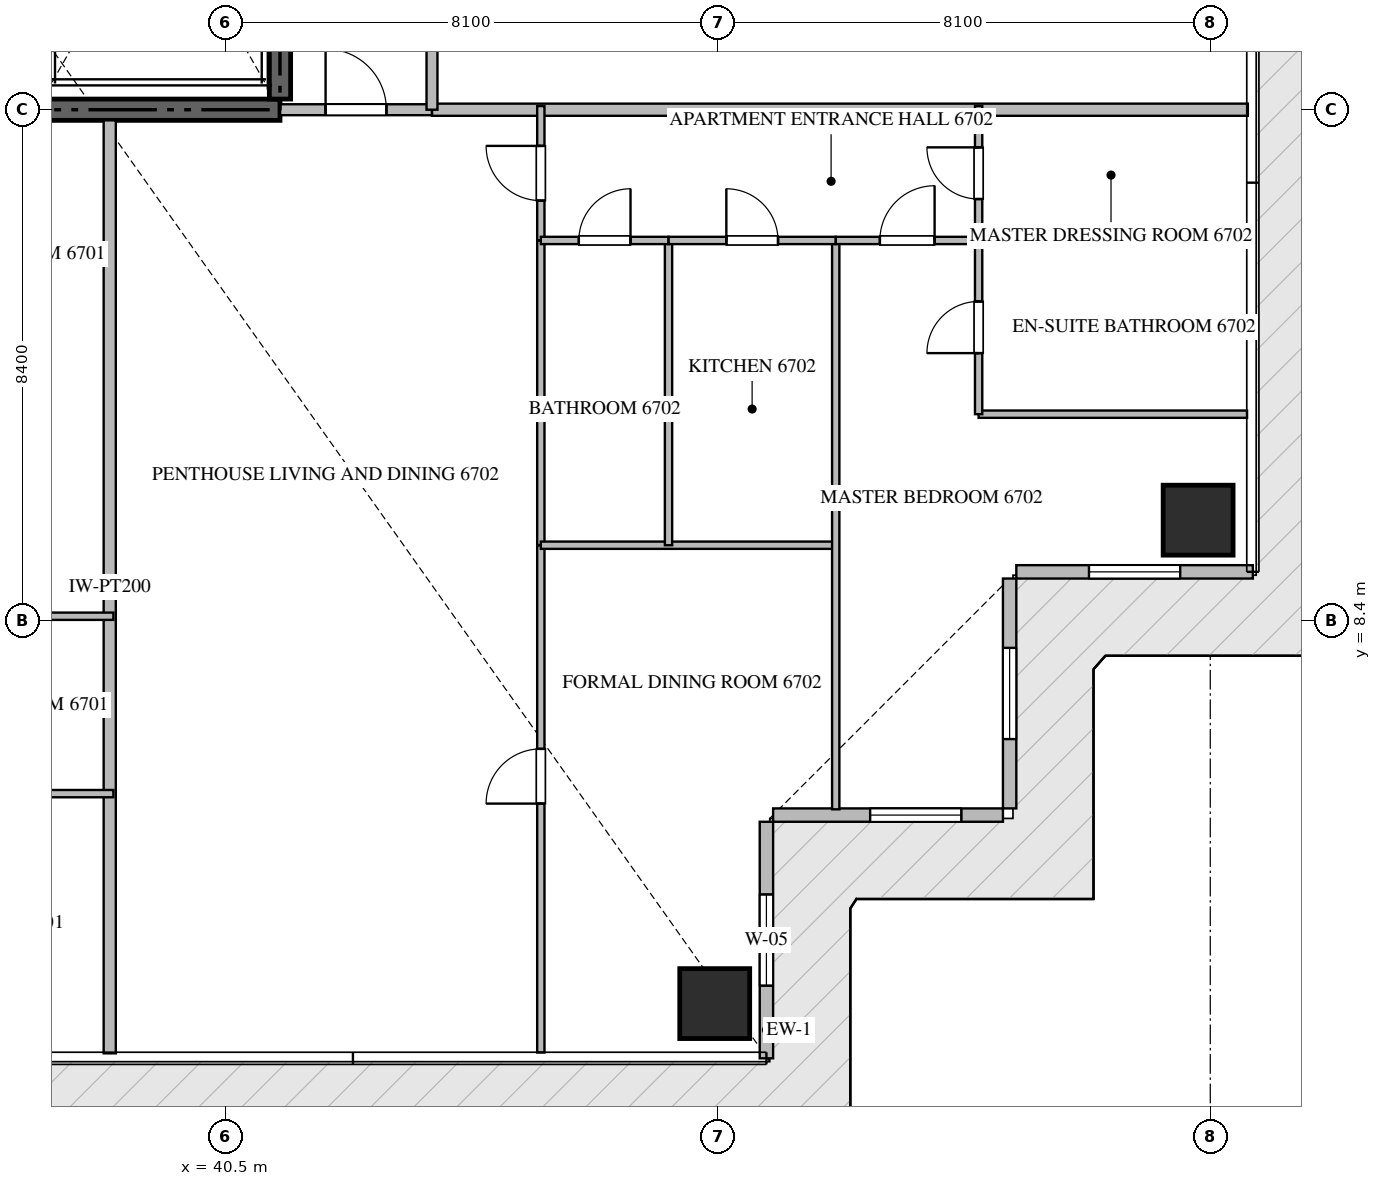
"""IFC4 building model, lengths in metres.
Left out: names, types, materials, properties, quantities, classifications, styles, units other than length and angle.
Written with IfcOpenShell. Run it as: python <this file> out.ifc"""

import sys

from ifc_helpers import new_model, si_unit, direction, frame, frame_2d, origin, origin_2d, place, context, subcontext, project, spatial, rectangle, extrude, source, transform, mapped, element, fill, save


model = new_model("IFC4")
c1 = context("Model", 3, precision=1e-05, world=origin(), true_north=direction((0.0, 1.0)))
c2 = subcontext(c1, "Body", "Model", "MODEL_VIEW")
j1 = project(units=[si_unit("LENGTHUNIT", "METRE"), si_unit("PLANEANGLEUNIT", "RADIAN")], contexts=[c1])
p1 = place(None, origin())
s1 = spatial("IfcSite", under=j1, at=p1, CompositionType="ELEMENT")
p2 = place(p1, origin())
s2 = spatial("IfcBuilding", under=s1, at=p2, CompositionType="ELEMENT")
p3 = place(p2, frame((0.0, 0.0, 268.2)))
s3 = spatial("IfcBuildingStorey", under=s2, at=p3, CompositionType="ELEMENT", Elevation=268.2)
p4 = place(p3, frame((23.4, 16.8, -0.26), z_axis=(0.0, 0.0, 1.0), x_axis=(1.0, 0.0, 0.0)))
e1 = element("IfcWall", 1, at=p4, inside=s3, PredefinedType="SHEAR", context=c2, shape_type="SweptSolid", body=[
    extrude(rectangle(XDim=18.0, YDim=0.35, at=frame_2d((9.0, 0.0))), origin(), (0.0, 0.0, 1.0), 3.848),
])
p5 = place(p3, frame((41.4, 16.975, -0.26), z_axis=(0.0, 0.0, 1.0), x_axis=(0.0, 1.0, 0.0)))
e2 = element("IfcWall", 2, at=p5, inside=s3, PredefinedType="SHEAR", context=c2, shape_type="SweptSolid", body=[
    extrude(rectangle(XDim=8.375, YDim=0.35, at=frame_2d((4.188, 0.0))), origin(), (0.0, 0.0, 1.0), 3.848),
])
m1 = source(origin(), c2, "Body", "SweptSolid", [
    extrude(rectangle(XDim=1.15, YDim=1.15, at=origin_2d()), origin(), (0.0, 0.0, 1.0), 3.85),
])
for number, where, z_axis, x_axis in (
    (3, (48.55, 2.1, -0.26), (0.0, 0.0, 1.0), (1.0, 0.0, 0.0)),
    (4, (56.5, 10.05, -0.26), (0.0, 0.0, 1.0), (1.0, 0.0, 0.0)),
):
    element("IfcColumn", number, at=place(p3, frame(where, z_axis=z_axis, x_axis=x_axis)), inside=s3, PredefinedType="COLUMN", context=c2, shape_type="MappedRepresentation", body=[
        mapped(m1, transform((0.0, 0.0, 0.0), scale=1.0)),
    ])
p6 = place(p3, frame((49.4, 1.2, 0.0), z_axis=(0.0, 0.0, 1.0), x_axis=(0.0, 1.0, 0.0)))
e5 = element("IfcWall", 5, at=p6, inside=s3, PredefinedType="ELEMENTEDWALL", context=c2, shape_type="SweptSolid", body=[
    extrude(rectangle(XDim=3.89, YDim=0.22, at=frame_2d((1.945, 0.0))), origin(), (0.0, 0.0, 1.0), 3.575),
])
p7 = place(p6, frame((1.195, 0.0, 0.65)))
e6 = element("IfcOpeningElement", 6, at=p7, cuts=e5, PredefinedType="OPENING", context=c2, shape_type="SweptSolid", body=[
    extrude(rectangle(XDim=1.5, YDim=2.25, at=frame_2d((0.75, 1.125))), frame((0.0, 0.12, 0.0), z_axis=(0.0, -1.0, 0.0), x_axis=(1.0, 0.0, 0.0)), (0.0, 0.0, 1.0), 0.24),
])
p8 = place(p3, frame((49.51, 5.2, 0.0), z_axis=(0.0, 0.0, 1.0), x_axis=(1.0, 0.0, 0.0)))
e7 = element("IfcWall", 7, at=p8, inside=s3, PredefinedType="ELEMENTEDWALL", context=c2, shape_type="SweptSolid", body=[
    extrude(rectangle(XDim=3.78, YDim=0.22, at=frame_2d((1.89, 0.0))), origin(), (0.0, 0.0, 1.0), 3.575),
])
p9 = place(p8, frame((1.596, 0.0, 0.65)))
e8 = element("IfcOpeningElement", 8, at=p9, cuts=e7, PredefinedType="OPENING", context=c2, shape_type="SweptSolid", body=[
    extrude(rectangle(XDim=1.5, YDim=2.25, at=frame_2d((0.75, 1.125))), frame((0.0, 0.12, 0.0), z_axis=(0.0, -1.0, 0.0), x_axis=(1.0, 0.0, 0.0)), (0.0, 0.0, 1.0), 0.24),
])
p10 = place(p3, frame((53.4, 5.31, 0.0), z_axis=(0.0, 0.0, 1.0), x_axis=(0.0, 1.0, 0.0)))
e9 = element("IfcWall", 9, at=p10, inside=s3, PredefinedType="ELEMENTEDWALL", context=c2, shape_type="SweptSolid", body=[
    extrude(rectangle(XDim=3.78, YDim=0.22, at=frame_2d((1.89, 0.0))), origin(), (0.0, 0.0, 1.0), 3.575),
])
p11 = place(p10, frame((1.14, 0.0, 0.65)))
e10 = element("IfcOpeningElement", 10, at=p11, cuts=e9, PredefinedType="OPENING", context=c2, shape_type="SweptSolid", body=[
    extrude(rectangle(XDim=1.5, YDim=2.25, at=frame_2d((0.75, 1.125))), frame((0.0, 0.12, 0.0), z_axis=(0.0, -1.0, 0.0), x_axis=(1.0, 0.0, 0.0)), (0.0, 0.0, 1.0), 0.24),
])
p12 = place(p3, frame((53.51, 9.2, 0.0), z_axis=(0.0, 0.0, 1.0), x_axis=(1.0, 0.0, 0.0)))
e11 = element("IfcWall", 11, at=p12, inside=s3, PredefinedType="ELEMENTEDWALL", context=c2, shape_type="SweptSolid", body=[
    extrude(rectangle(XDim=3.89, YDim=0.22, at=frame_2d((1.945, 0.0))), origin(), (0.0, 0.0, 1.0), 3.575),
])
p13 = place(p12, frame((1.195, 0.0, 0.65)))
e12 = element("IfcOpeningElement", 12, at=p13, cuts=e11, PredefinedType="OPENING", context=c2, shape_type="SweptSolid", body=[
    extrude(rectangle(XDim=1.5, YDim=2.25, at=frame_2d((0.75, 1.125))), frame((0.0, 0.12, 0.0), z_axis=(0.0, -1.0, 0.0), x_axis=(1.0, 0.0, 0.0)), (0.0, 0.0, 1.0), 0.24),
])
p14 = place(p3, frame((38.6, 1.282, 0.0), z_axis=(0.0, 0.0, 1.0), x_axis=(0.0, 1.0, 0.0)))
e13 = element("IfcWall", 13, at=p14, inside=s3, PredefinedType="PARTITIONING", context=c2, shape_type="SweptSolid", body=[
    extrude(rectangle(XDim=15.343, YDim=0.2, at=frame_2d((7.671, 0.0))), origin(), (0.0, 0.0, 1.0), 3.59),
])
p15 = place(p3, frame((43.9, 16.8, 0.0), z_axis=(0.0, 0.0, 1.0), x_axis=(1.0, 0.0, 0.0)))
e14 = element("IfcWall", 14, at=p15, inside=s3, PredefinedType="PARTITIONING", context=c2, shape_type="SweptSolid", body=[
    extrude(rectangle(XDim=13.418, YDim=0.2, at=frame_2d((6.709, 0.0))), origin(), (0.0, 0.0, 1.0), 3.59),
])
p16 = place(p3, frame((41.402, 16.8, 0.0), z_axis=(0.0, 0.0, 1.0), x_axis=(1.0, 0.0, 0.0)))
e15 = element("IfcWall", 15, at=p16, inside=s3, PredefinedType="PARTITIONING", context=c2, shape_type="SweptSolid", body=[
    extrude(rectangle(XDim=2.496, YDim=0.18, at=frame_2d((1.248, 0.0))), origin(), (0.0, 0.0, 1.0), 3.59),
])
p17 = place(p16, frame((0.748, 0.0, 0.0)))
e16 = element("IfcOpeningElement", 16, at=p17, cuts=e15, PredefinedType="OPENING", context=c2, shape_type="SweptSolid", body=[
    extrude(rectangle(XDim=1.0, YDim=2.15, at=frame_2d((0.5, 1.075))), frame((0.0, 0.1, 0.0), z_axis=(0.0, -1.0, 0.0), x_axis=(1.0, 0.0, 0.0)), (0.0, 0.0, 1.0), 0.2),
])
p18 = place(p3, frame((43.9, 16.8, 0.0), z_axis=(0.0, 0.0, 1.0), x_axis=(0.0, 1.0, 0.0)))
e17 = element("IfcWall", 17, at=p18, inside=s3, PredefinedType="PARTITIONING", context=c2, shape_type="SweptSolid", body=[
    extrude(rectangle(XDim=16.8, YDim=0.18, at=frame_2d((8.4, 0.0))), origin(), (0.0, 0.0, 1.0), 3.59),
])
p19 = place(p18, frame((2.67, 0.0, 0.0)))
e18 = element("IfcOpeningElement", 18, at=p19, cuts=e17, PredefinedType="OPENING", context=c2, shape_type="SweptSolid", body=[
    extrude(rectangle(XDim=1.0, YDim=2.15, at=frame_2d((0.5, 1.075))), frame((0.0, 0.1, 0.0), z_axis=(0.0, -1.0, 0.0), x_axis=(1.0, 0.0, 0.0)), (0.0, 0.0, 1.0), 0.2),
])
p20 = place(p18, frame((11.107, 0.0, 0.0)))
e19 = element("IfcOpeningElement", 19, at=p20, cuts=e17, PredefinedType="OPENING", context=c2, shape_type="SweptSolid", body=[
    extrude(rectangle(XDim=1.0, YDim=2.15, at=frame_2d((0.5, 1.075))), frame((0.0, 0.1, 0.0), z_axis=(0.0, -1.0, 0.0), x_axis=(1.0, 0.0, 0.0)), (0.0, 0.0, 1.0), 0.2),
])
for number, where, z_axis, x_axis in (
    (20, (33.8, 5.553, 0.0), (0.0, 0.0, 1.0), (1.0, 0.0, 0.0)),
    (21, (33.8, 8.47, 0.0), (0.0, 0.0, 1.0), (1.0, 0.0, 0.0)),
):
    element("IfcWall", number, at=place(p3, frame(where, z_axis=z_axis, x_axis=x_axis)), inside=s3, PredefinedType="PARTITIONING", context=c2, shape_type="SweptSolid", body=[
        extrude(rectangle(XDim=4.86, YDim=0.12, at=frame_2d((2.43, 0.0))), origin(), (0.0, 0.0, 1.0), 3.59),
    ])
p21 = place(p3, frame((45.69, 14.65, 0.0), z_axis=(0.0, 0.0, 1.0), x_axis=(0.0, 1.0, 0.0)))
e22 = element("IfcWall", 22, at=p21, inside=s3, PredefinedType="PARTITIONING", context=c2, shape_type="SweptSolid", body=[
    extrude(rectangle(XDim=2.21, YDim=0.12, at=frame_2d((1.105, 0.0))), origin(), (0.0, 0.0, 1.0), 3.59),
])
p22 = place(p21, frame((0.655, 0.0, 0.0)))
e23 = element("IfcOpeningElement", 23, at=p22, cuts=e22, PredefinedType="OPENING", context=c2, shape_type="SweptSolid", body=[
    extrude(rectangle(XDim=0.9, YDim=2.1, at=frame_2d((0.45, 1.05))), frame((0.0, 0.07, 0.0), z_axis=(0.0, -1.0, 0.0), x_axis=(1.0, 0.0, 0.0)), (0.0, 0.0, 1.0), 0.14),
])
p23 = place(p3, frame((45.69, 1.295, 0.0), z_axis=(0.0, 0.0, 1.0), x_axis=(0.0, 1.0, 0.0)))
e24 = element("IfcWall", 24, at=p23, inside=s3, PredefinedType="PARTITIONING", context=c2, shape_type="SweptSolid", body=[
    extrude(rectangle(XDim=8.343, YDim=0.12, at=frame_2d((4.171, 0.0))), origin(), (0.0, 0.0, 1.0), 3.59),
])
p24 = place(p23, frame((4.094, 0.0, 0.0)))
e25 = element("IfcOpeningElement", 25, at=p24, cuts=e24, PredefinedType="OPENING", context=c2, shape_type="SweptSolid", body=[
    extrude(rectangle(XDim=0.9, YDim=2.1, at=frame_2d((0.45, 1.05))), frame((0.0, 0.07, 0.0), z_axis=(0.0, -1.0, 0.0), x_axis=(1.0, 0.0, 0.0)), (0.0, 0.0, 1.0), 0.14),
])
p25 = place(p3, frame((45.69, 9.64, 0.0), z_axis=(0.0, 0.0, 1.0), x_axis=(0.0, 1.0, 0.0)))
e26 = element("IfcWall", 26, at=p25, inside=s3, PredefinedType="PARTITIONING", context=c2, shape_type="SweptSolid", body=[
    extrude(rectangle(XDim=5.008, YDim=0.12, at=frame_2d((2.504, 0.0))), origin(), (0.0, 0.0, 1.0), 3.59),
])
p26 = place(p3, frame((45.69, 9.638, 0.0), z_axis=(0.0, 0.0, 1.0), x_axis=(1.0, 0.0, 0.0)))
e27 = element("IfcWall", 27, at=p26, inside=s3, PredefinedType="PARTITIONING", context=c2, shape_type="SweptSolid", body=[
    extrude(rectangle(XDim=4.85, YDim=0.12, at=frame_2d((2.425, 0.0))), origin(), (0.0, 0.0, 1.0), 3.59),
])
p27 = place(p3, frame((50.54, 5.295, 0.0), z_axis=(0.0, 0.0, 1.0), x_axis=(0.0, 1.0, 0.0)))
e28 = element("IfcWall", 28, at=p27, inside=s3, PredefinedType="PARTITIONING", context=c2, shape_type="SweptSolid", body=[
    extrude(rectangle(XDim=9.355, YDim=0.12, at=frame_2d((4.677, 0.0))), origin(), (0.0, 0.0, 1.0), 3.59),
])
p28 = place(p3, frame((47.79, 9.638, 0.0), z_axis=(0.0, 0.0, 1.0), x_axis=(0.0, 1.0, 0.0)))
e29 = element("IfcWall", 29, at=p28, inside=s3, PredefinedType="PARTITIONING", context=c2, shape_type="SweptSolid", body=[
    extrude(rectangle(XDim=5.012, YDim=0.12, at=frame_2d((2.506, 0.0))), origin(), (0.0, 0.0, 1.0), 3.59),
])
p29 = place(p3, frame((45.69, 14.65, 0.0), z_axis=(0.0, 0.0, 1.0), x_axis=(1.0, 0.0, 0.0)))
e30 = element("IfcWall", 30, at=p29, inside=s3, PredefinedType="PARTITIONING", context=c2, shape_type="SweptSolid", body=[
    extrude(rectangle(XDim=2.1, YDim=0.12, at=frame_2d((1.05, 0.0))), origin(), (0.0, 0.0, 1.0), 3.59),
])
p30 = place(p29, frame((0.625, 0.0, 0.0)))
e31 = element("IfcOpeningElement", 31, at=p30, cuts=e30, PredefinedType="OPENING", context=c2, shape_type="SweptSolid", body=[
    extrude(rectangle(XDim=0.85, YDim=2.1, at=frame_2d((0.425, 1.05))), frame((0.0, 0.07, 0.0), z_axis=(0.0, -1.0, 0.0), x_axis=(1.0, 0.0, 0.0)), (0.0, 0.0, 1.0), 0.14),
])
p31 = place(p3, frame((47.792, 14.65, 0.0), z_axis=(0.0, 0.0, 1.0), x_axis=(1.0, 0.0, 0.0)))
e32 = element("IfcWall", 32, at=p31, inside=s3, PredefinedType="PARTITIONING", context=c2, shape_type="SweptSolid", body=[
    extrude(rectangle(XDim=2.748, YDim=0.12, at=frame_2d((1.374, 0.0))), origin(), (0.0, 0.0, 1.0), 3.59),
])
p32 = place(p31, frame((0.949, 0.0, 0.0)))
e33 = element("IfcOpeningElement", 33, at=p32, cuts=e32, PredefinedType="OPENING", context=c2, shape_type="SweptSolid", body=[
    extrude(rectangle(XDim=0.85, YDim=2.1, at=frame_2d((0.425, 1.05))), frame((0.0, 0.07, 0.0), z_axis=(0.0, -1.0, 0.0), x_axis=(1.0, 0.0, 0.0)), (0.0, 0.0, 1.0), 0.14),
])
p33 = place(p3, frame((50.542, 14.65, 0.0), z_axis=(0.0, 0.0, 1.0), x_axis=(1.0, 0.0, 0.0)))
e34 = element("IfcWall", 34, at=p33, inside=s3, PredefinedType="PARTITIONING", context=c2, shape_type="SweptSolid", body=[
    extrude(rectangle(XDim=2.348, YDim=0.12, at=frame_2d((1.174, 0.0))), origin(), (0.0, 0.0, 1.0), 3.59),
])
p34 = place(p33, frame((0.724, 0.0, 0.0)))
e35 = element("IfcOpeningElement", 35, at=p34, cuts=e34, PredefinedType="OPENING", context=c2, shape_type="SweptSolid", body=[
    extrude(rectangle(XDim=0.9, YDim=2.1, at=frame_2d((0.45, 1.05))), frame((0.0, 0.07, 0.0), z_axis=(0.0, -1.0, 0.0), x_axis=(1.0, 0.0, 0.0)), (0.0, 0.0, 1.0), 0.14),
])
p35 = place(p3, frame((52.89, 11.793, 0.0), z_axis=(0.0, 0.0, 1.0), x_axis=(1.0, 0.0, 0.0)))
e36 = element("IfcWall", 36, at=p35, inside=s3, PredefinedType="PARTITIONING", context=c2, shape_type="SweptSolid", body=[
    extrude(rectangle(XDim=4.415, YDim=0.12, at=frame_2d((2.208, 0.0))), origin(), (0.0, 0.0, 1.0), 3.59),
])
p36 = place(p3, frame((52.892, 14.65, 0.0), z_axis=(0.0, 0.0, 1.0), x_axis=(1.0, 0.0, 0.0)))
e37 = element("IfcWall", 37, at=p36, inside=s3, PredefinedType="PARTITIONING", context=c2, shape_type="SweptSolid", body=[
    extrude(rectangle(XDim=4.413, YDim=0.12, at=frame_2d((2.207, 0.0))), origin(), (0.0, 0.0, 1.0), 3.59),
])
p37 = place(p3, frame((52.89, 11.793, 0.0), z_axis=(0.0, 0.0, 1.0), x_axis=(0.0, 1.0, 0.0)))
e38 = element("IfcWall", 38, at=p37, inside=s3, PredefinedType="PARTITIONING", context=c2, shape_type="SweptSolid", body=[
    extrude(rectangle(XDim=2.857, YDim=0.12, at=frame_2d((1.428, 0.0))), origin(), (0.0, 0.0, 1.0), 3.59),
])
p38 = place(p37, frame((1.004, 0.0, 0.0)))
e39 = element("IfcOpeningElement", 39, at=p38, cuts=e38, PredefinedType="OPENING", context=c2, shape_type="SweptSolid", body=[
    extrude(rectangle(XDim=0.85, YDim=2.1, at=frame_2d((0.425, 1.05))), frame((0.0, 0.07, 0.0), z_axis=(0.0, -1.0, 0.0), x_axis=(1.0, 0.0, 0.0)), (0.0, 0.0, 1.0), 0.14),
])
p39 = place(p3, frame((52.89, 14.652, 0.0), z_axis=(0.0, 0.0, 1.0), x_axis=(0.0, 1.0, 0.0)))
e40 = element("IfcWall", 40, at=p39, inside=s3, PredefinedType="PARTITIONING", context=c2, shape_type="SweptSolid", body=[
    extrude(rectangle(XDim=2.208, YDim=0.12, at=frame_2d((1.104, 0.0))), origin(), (0.0, 0.0, 1.0), 3.59),
])
p40 = place(p39, frame((0.679, 0.0, 0.0)))
e41 = element("IfcOpeningElement", 41, at=p40, cuts=e40, PredefinedType="OPENING", context=c2, shape_type="SweptSolid", body=[
    extrude(rectangle(XDim=0.85, YDim=2.1, at=frame_2d((0.425, 1.05))), frame((0.0, 0.07, 0.0), z_axis=(0.0, -1.0, 0.0), x_axis=(1.0, 0.0, 0.0)), (0.0, 0.0, 1.0), 0.14),
])
m2 = source(origin(), c2, "Body", "SweptSolid", [
    extrude(rectangle(XDim=1.5, YDim=2.25, at=frame_2d((0.75, 1.125))), frame((0.0, 0.03, 0.0), z_axis=(0.0, -1.0, 0.0), x_axis=(1.0, 0.0, 0.0)), (0.0, 0.0, 1.0), 0.06),
])
p41 = place(p7, origin())
e42 = element("IfcWindow", 42, at=p41, inside=s3, PartitioningType="SINGLE_PANEL", PredefinedType="WINDOW", context=c2, shape_type="MappedRepresentation", body=[
    mapped(m2, transform((0.0, 0.0, 0.0), scale=1.0)),
])
fill(e6, e42)
p42 = place(p9, origin())
e43 = element("IfcWindow", 43, at=p42, inside=s3, PartitioningType="SINGLE_PANEL", PredefinedType="WINDOW", context=c2, shape_type="MappedRepresentation", body=[
    mapped(m2, transform((0.0, 0.0, 0.0), scale=1.0)),
])
fill(e8, e43)
p43 = place(p11, origin())
e44 = element("IfcWindow", 44, at=p43, inside=s3, PartitioningType="SINGLE_PANEL", PredefinedType="WINDOW", context=c2, shape_type="MappedRepresentation", body=[
    mapped(m2, transform((0.0, 0.0, 0.0), scale=1.0)),
])
fill(e10, e44)
p44 = place(p13, origin())
e45 = element("IfcWindow", 45, at=p44, inside=s3, PartitioningType="SINGLE_PANEL", PredefinedType="WINDOW", context=c2, shape_type="MappedRepresentation", body=[
    mapped(m2, transform((0.0, 0.0, 0.0), scale=1.0)),
])
fill(e12, e45)
m3 = source(origin(), c2, "Body", "SweptSolid", [
    extrude(rectangle(XDim=1.0, YDim=2.15, at=frame_2d((0.5, 1.075))), frame((0.0, 0.025, 0.0), z_axis=(0.0, -1.0, 0.0), x_axis=(1.0, 0.0, 0.0)), (0.0, 0.0, 1.0), 0.05),
])
p45 = place(p17, origin())
e46 = element("IfcDoor", 46, at=p45, inside=s3, OperationType="SINGLE_SWING_LEFT", PredefinedType="DOOR", context=c2, shape_type="MappedRepresentation", body=[
    mapped(m3, transform((0.0, 0.0, 0.0), scale=1.0)),
])
fill(e16, e46)
m4 = source(origin(), c2, "Body", "SweptSolid", [
    extrude(rectangle(XDim=0.9, YDim=2.1, at=frame_2d((0.45, 1.05))), frame((0.0, 0.025, 0.0), z_axis=(0.0, -1.0, 0.0), x_axis=(1.0, 0.0, 0.0)), (0.0, 0.0, 1.0), 0.05),
])
p46 = place(p22, origin())
e47 = element("IfcDoor", 47, at=p46, inside=s3, OperationType="SINGLE_SWING_RIGHT", PredefinedType="DOOR", context=c2, shape_type="MappedRepresentation", body=[
    mapped(m4, transform((0.0, 0.0, 0.0), scale=1.0)),
])
fill(e23, e47)
p47 = place(p24, origin())
e48 = element("IfcDoor", 48, at=p47, inside=s3, OperationType="SINGLE_SWING_LEFT", PredefinedType="DOOR", context=c2, shape_type="MappedRepresentation", body=[
    mapped(m4, transform((0.0, 0.0, 0.0), scale=1.0)),
])
fill(e25, e48)
m5 = source(origin(), c2, "Body", "SweptSolid", [
    extrude(rectangle(XDim=0.85, YDim=2.1, at=frame_2d((0.425, 1.05))), frame((0.0, 0.025, 0.0), z_axis=(0.0, -1.0, 0.0), x_axis=(1.0, 0.0, 0.0)), (0.0, 0.0, 1.0), 0.05),
])
p48 = place(p30, origin())
e49 = element("IfcDoor", 49, at=p48, inside=s3, OperationType="SINGLE_SWING_RIGHT", PredefinedType="DOOR", context=c2, shape_type="MappedRepresentation", body=[
    mapped(m5, transform((0.0, 0.0, 0.0), scale=1.0)),
])
fill(e31, e49)
p49 = place(p32, origin())
e50 = element("IfcDoor", 50, at=p49, inside=s3, OperationType="SINGLE_SWING_LEFT", PredefinedType="DOOR", context=c2, shape_type="MappedRepresentation", body=[
    mapped(m5, transform((0.0, 0.0, 0.0), scale=1.0)),
])
fill(e33, e50)
p50 = place(p34, origin())
e51 = element("IfcDoor", 51, at=p50, inside=s3, OperationType="SINGLE_SWING_RIGHT", PredefinedType="DOOR", context=c2, shape_type="MappedRepresentation", body=[
    mapped(m4, transform((0.0, 0.0, 0.0), scale=1.0)),
])
fill(e35, e51)
p51 = place(p38, origin())
e52 = element("IfcDoor", 52, at=p51, inside=s3, OperationType="SINGLE_SWING_LEFT", PredefinedType="DOOR", context=c2, shape_type="MappedRepresentation", body=[
    mapped(m5, transform((0.0, 0.0, 0.0), scale=1.0)),
])
fill(e39, e52)
p52 = place(p40, origin())
e53 = element("IfcDoor", 53, at=p52, inside=s3, OperationType="SINGLE_SWING_RIGHT", PredefinedType="DOOR", context=c2, shape_type="MappedRepresentation", body=[
    mapped(m5, transform((0.0, 0.0, 0.0), scale=1.0)),
])
fill(e41, e53)
save(model, sys.argv[1])
